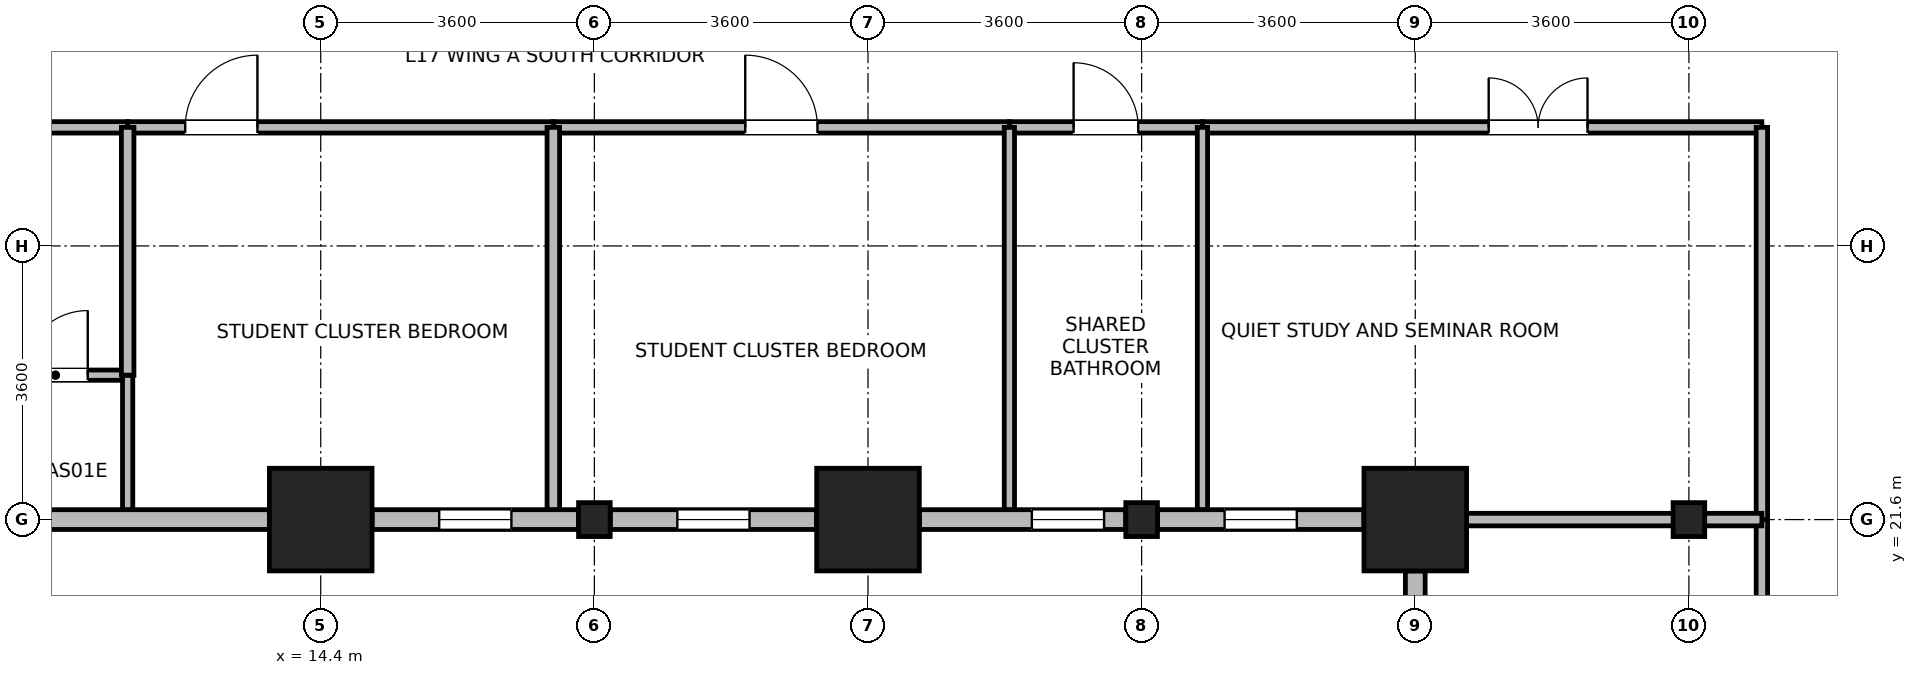
"""IFC4 building model, lengths in metres.
Left out: names, types, materials, properties, quantities, classifications, styles, units other than length and angle.
Written with IfcOpenShell. Run it as: python <this file> out.ifc"""

import sys

from ifc_helpers import new_model, si_unit, direction, frame, frame_2d, origin, origin_2d, place, context, subcontext, project, spatial, rectangle, i_section, extrude, source, transform, mapped, element, fill, save


model = new_model("IFC4")
c1 = context("Model", 3, precision=1e-05, world=origin(), true_north=direction((0.0, 1.0)))
c2 = subcontext(c1, "Body", "Model", "MODEL_VIEW")
j1 = project(units=[si_unit("LENGTHUNIT", "METRE"), si_unit("PLANEANGLEUNIT", "RADIAN")], contexts=[c1])
p1 = place(None, origin())
s1 = spatial("IfcSite", under=j1, at=p1, CompositionType="ELEMENT")
p2 = place(p1, origin())
s2 = spatial("IfcBuilding", under=s1, at=p2, CompositionType="ELEMENT")
p3 = place(p2, frame((0.0, 0.0, 69.7)))
s3 = spatial("IfcBuildingStorey", under=s2, at=p3, CompositionType="ELEMENT", Elevation=69.7)
m1 = source(origin(), c2, "Body", "SweptSolid", [
    extrude(rectangle(XDim=1.35, YDim=1.35, at=origin_2d()), origin(), (0.0, 0.0, 1.0), 3.7),
])
for number, where, z_axis, x_axis in (
    (1, (14.4, 21.6, 0.0), (0.0, 0.0, 1.0), (1.0, 0.0, 0.0)),
    (2, (21.6, 21.6, 0.0), (0.0, 0.0, 1.0), (1.0, 0.0, 0.0)),
    (3, (28.8, 21.6, 0.0), (0.0, 0.0, 1.0), (1.0, 0.0, 0.0)),
):
    element("IfcColumn", number, at=place(p3, frame(where, z_axis=z_axis, x_axis=x_axis)), inside=s3, PredefinedType="COLUMN", context=c2, shape_type="MappedRepresentation", body=[
        mapped(m1, transform((0.0, 0.0, 0.0), x_axis=(1.0, 0.0, 0.0), y_axis=(0.0, 1.0, 0.0), z_axis=(0.0, 0.0, 1.0), scale=1.0)),
    ])
m2 = source(origin(), c2, "Body", "SweptSolid", [
    extrude(i_section(OverallWidth=0.416, OverallDepth=0.446, WebThickness=0.029, FlangeThickness=0.04, FilletRadius=0.015, at=origin_2d()), origin(), (0.0, 0.0, 1.0), 3.7),
])
for number, where, z_axis, x_axis in (
    (4, (18.0, 21.6, 0.0), (0.0, 0.0, 1.0), (1.0, 0.0, 0.0)),
    (5, (25.2, 21.6, 0.0), (0.0, 0.0, 1.0), (1.0, 0.0, 0.0)),
    (6, (32.4, 21.6, 0.0), (0.0, 0.0, 1.0), (1.0, 0.0, 0.0)),
):
    element("IfcColumn", number, at=place(p3, frame(where, z_axis=z_axis, x_axis=x_axis)), inside=s3, PredefinedType="COLUMN", context=c2, shape_type="MappedRepresentation", body=[
        mapped(m2, transform((0.0, 0.0, 0.0), x_axis=(1.0, 0.0, 0.0), y_axis=(0.0, 1.0, 0.0), z_axis=(0.0, 0.0, 1.0), scale=1.0)),
    ])
p4 = place(p3, frame((13.724, 21.6, 0.0), z_axis=(0.0, 0.0, 1.0), x_axis=(-1.0, 0.0, 0.0)))
e7 = element("IfcWall", 7, at=p4, inside=s3, PredefinedType="STANDARD", context=c2, shape_type="SweptSolid", body=[
    extrude(rectangle(XDim=9.989, YDim=0.26, at=frame_2d((4.995, 0.0))), origin(), (0.0, 0.0, 1.0), 3.32),
])
p5 = place(p4, frame((4.244, 0.0, 0.85)))
e8 = element("IfcOpeningElement", 8, at=p5, cuts=e7, PredefinedType="OPENING", context=c2, shape_type="SweptSolid", body=[
    extrude(rectangle(XDim=1.5, YDim=1.85, at=frame_2d((0.75, 0.925))), frame((0.0, 0.14, 0.0), z_axis=(0.0, -1.0, 0.0), x_axis=(1.0, 0.0, 0.0)), (0.0, 0.0, 1.0), 0.28),
])
p6 = place(p4, frame((7.574, 0.0, 0.85)))
e9 = element("IfcOpeningElement", 9, at=p6, cuts=e7, PredefinedType="OPENING", context=c2, shape_type="SweptSolid", body=[
    extrude(rectangle(XDim=1.5, YDim=1.85, at=frame_2d((0.75, 0.925))), frame((0.0, 0.14, 0.0), z_axis=(0.0, -1.0, 0.0), x_axis=(1.0, 0.0, 0.0)), (0.0, 0.0, 1.0), 0.28),
])
p7 = place(p3, frame((17.791, 21.6, 0.0), z_axis=(0.0, 0.0, 1.0), x_axis=(-1.0, 0.0, 0.0)))
e10 = element("IfcWall", 10, at=p7, inside=s3, PredefinedType="STANDARD", context=c2, shape_type="SweptSolid", body=[
    extrude(rectangle(XDim=2.715, YDim=0.26, at=frame_2d((1.357, 0.0))), origin(), (0.0, 0.0, 1.0), 2.82),
])
p8 = place(p7, frame((0.883, 0.0, 0.85)))
e11 = element("IfcOpeningElement", 11, at=p8, cuts=e10, PredefinedType="OPENING", context=c2, shape_type="SweptSolid", body=[
    extrude(rectangle(XDim=0.95, YDim=1.75, at=frame_2d((0.475, 0.875))), frame((0.0, 0.14, 0.0), z_axis=(0.0, -1.0, 0.0), x_axis=(1.0, 0.0, 0.0)), (0.0, 0.0, 1.0), 0.28),
])
p9 = place(p3, frame((20.924, 21.6, 0.0), z_axis=(0.0, 0.0, 1.0), x_axis=(-1.0, 0.0, 0.0)))
e12 = element("IfcWall", 12, at=p9, inside=s3, PredefinedType="STANDARD", context=c2, shape_type="SweptSolid", body=[
    extrude(rectangle(XDim=2.715, YDim=0.26, at=frame_2d((1.357, 0.0))), origin(), (0.0, 0.0, 1.0), 2.82),
])
p10 = place(p9, frame((0.883, 0.0, 0.85)))
e13 = element("IfcOpeningElement", 13, at=p10, cuts=e12, PredefinedType="OPENING", context=c2, shape_type="SweptSolid", body=[
    extrude(rectangle(XDim=0.95, YDim=1.75, at=frame_2d((0.475, 0.875))), frame((0.0, 0.14, 0.0), z_axis=(0.0, -1.0, 0.0), x_axis=(1.0, 0.0, 0.0)), (0.0, 0.0, 1.0), 0.28),
])
p11 = place(p3, frame((24.991, 21.6, 0.0), z_axis=(0.0, 0.0, 1.0), x_axis=(-1.0, 0.0, 0.0)))
e14 = element("IfcWall", 14, at=p11, inside=s3, PredefinedType="STANDARD", context=c2, shape_type="SweptSolid", body=[
    extrude(rectangle(XDim=2.715, YDim=0.26, at=frame_2d((1.357, 0.0))), origin(), (0.0, 0.0, 1.0), 2.82),
])
p12 = place(p11, frame((0.285, 0.0, 0.85)))
e15 = element("IfcOpeningElement", 15, at=p12, cuts=e14, PredefinedType="OPENING", context=c2, shape_type="SweptSolid", body=[
    extrude(rectangle(XDim=0.95, YDim=1.75, at=frame_2d((0.475, 0.875))), frame((0.0, 0.14, 0.0), z_axis=(0.0, -1.0, 0.0), x_axis=(1.0, 0.0, 0.0)), (0.0, 0.0, 1.0), 0.28),
])
p13 = place(p3, frame((28.124, 21.6, 0.0), z_axis=(0.0, 0.0, 1.0), x_axis=(-1.0, 0.0, 0.0)))
e16 = element("IfcWall", 16, at=p13, inside=s3, PredefinedType="STANDARD", context=c2, shape_type="SweptSolid", body=[
    extrude(rectangle(XDim=2.715, YDim=0.26, at=frame_2d((1.357, 0.0))), origin(), (0.0, 0.0, 1.0), 2.82),
])
p14 = place(p13, frame((0.883, 0.0, 0.85)))
e17 = element("IfcOpeningElement", 17, at=p14, cuts=e16, PredefinedType="OPENING", context=c2, shape_type="SweptSolid", body=[
    extrude(rectangle(XDim=0.95, YDim=1.75, at=frame_2d((0.475, 0.875))), frame((0.0, 0.14, 0.0), z_axis=(0.0, -1.0, 0.0), x_axis=(1.0, 0.0, 0.0)), (0.0, 0.0, 1.0), 0.28),
])
p15 = place(p3, frame((28.8, 1.67, 0.0), z_axis=(0.0, 0.0, 1.0), x_axis=(0.0, 1.0, 0.0)))
e18 = element("IfcWall", 18, at=p15, inside=s3, PredefinedType="STANDARD", context=c2, shape_type="SweptSolid", body=[
    extrude(rectangle(XDim=19.254, YDim=0.26, at=frame_2d((9.627, 0.0))), origin(), (0.0, 0.0, 1.0), 3.32),
])
p16 = place(p15, frame((0.854, 0.0, 0.85)))
e19 = element("IfcOpeningElement", 19, at=p16, cuts=e18, PredefinedType="OPENING", context=c2, shape_type="SweptSolid", body=[
    extrude(rectangle(XDim=1.5, YDim=1.85, at=frame_2d((0.75, 0.925))), frame((0.0, 0.14, 0.0), z_axis=(0.0, -1.0, 0.0), x_axis=(1.0, 0.0, 0.0)), (0.0, 0.0, 1.0), 0.28),
])
p17 = place(p15, frame((7.272, 0.0, 0.85)))
e20 = element("IfcOpeningElement", 20, at=p17, cuts=e18, PredefinedType="OPENING", context=c2, shape_type="SweptSolid", body=[
    extrude(rectangle(XDim=1.5, YDim=1.85, at=frame_2d((0.75, 0.925))), frame((0.0, 0.14, 0.0), z_axis=(0.0, -1.0, 0.0), x_axis=(1.0, 0.0, 0.0)), (0.0, 0.0, 1.0), 0.28),
])
p18 = place(p15, frame((10.481, 0.0, 0.85)))
e21 = element("IfcOpeningElement", 21, at=p18, cuts=e18, PredefinedType="OPENING", context=c2, shape_type="SweptSolid", body=[
    extrude(rectangle(XDim=1.5, YDim=1.85, at=frame_2d((0.75, 0.925))), frame((0.0, 0.14, 0.0), z_axis=(0.0, -1.0, 0.0), x_axis=(1.0, 0.0, 0.0)), (0.0, 0.0, 1.0), 0.28),
])
p19 = place(p15, frame((13.69, 0.0, 0.85)))
e22 = element("IfcOpeningElement", 22, at=p19, cuts=e18, PredefinedType="OPENING", context=c2, shape_type="SweptSolid", body=[
    extrude(rectangle(XDim=1.5, YDim=1.85, at=frame_2d((0.75, 0.925))), frame((0.0, 0.14, 0.0), z_axis=(0.0, -1.0, 0.0), x_axis=(1.0, 0.0, 0.0)), (0.0, 0.0, 1.0), 0.28),
])
p20 = place(p15, frame((16.899, 0.0, 0.85)))
e23 = element("IfcOpeningElement", 23, at=p20, cuts=e18, PredefinedType="OPENING", context=c2, shape_type="SweptSolid", body=[
    extrude(rectangle(XDim=1.5, YDim=1.85, at=frame_2d((0.75, 0.925))), frame((0.0, 0.14, 0.0), z_axis=(0.0, -1.0, 0.0), x_axis=(1.0, 0.0, 0.0)), (0.0, 0.0, 1.0), 0.28),
])
p21 = place(p3, frame((9.96, 23.5, 0.0), z_axis=(0.0, 0.0, 1.0), x_axis=(1.0, 0.0, 0.0)))
e24 = element("IfcWall", 24, at=p21, inside=s3, PredefinedType="PARTITIONING", context=c2, shape_type="SweptSolid", body=[
    extrude(rectangle(XDim=1.9, YDim=0.135, at=frame_2d((0.95, 0.0))), origin(), (0.0, 0.0, 1.0), 3.32),
])
p22 = place(p21, frame((0.525, 0.0, 0.0)))
e25 = element("IfcOpeningElement", 25, at=p22, cuts=e24, PredefinedType="OPENING", context=c2, shape_type="SweptSolid", body=[
    extrude(rectangle(XDim=0.85, YDim=2.04, at=frame_2d((0.425, 1.02))), frame((0.0, 0.078, 0.0), z_axis=(0.0, -1.0, 0.0), x_axis=(1.0, 0.0, 0.0)), (0.0, 0.0, 1.0), 0.155),
])
p23 = place(p3, frame((11.86, 21.732, 0.0), z_axis=(0.0, 0.0, 1.0), x_axis=(0.0, 1.0, 0.0)))
e26 = element("IfcWall", 26, at=p23, inside=s3, PredefinedType="PARTITIONING", context=c2, shape_type="SweptSolid", body=[
    extrude(rectangle(XDim=1.768, YDim=0.135, at=frame_2d((0.884, 0.0))), origin(), (0.0, 0.0, 1.0), 3.32),
])
p24 = place(p3, frame((3.732, 26.76, 0.0), z_axis=(0.0, 0.0, 1.0), x_axis=(1.0, 0.0, 0.0)))
e27 = element("IfcWall", 27, at=p24, inside=s3, PredefinedType="PARTITIONING", context=c2, shape_type="SweptSolid", body=[
    extrude(rectangle(XDim=8.128, YDim=0.15, at=frame_2d((4.064, 0.0))), origin(), (0.0, 0.0, 1.0), 3.32),
])
p25 = place(p24, frame((4.402, 0.0, 0.0)))
e28 = element("IfcOpeningElement", 28, at=p25, cuts=e27, PredefinedType="OPENING", context=c2, shape_type="SweptSolid", body=[
    extrude(rectangle(XDim=0.95, YDim=2.1, at=frame_2d((0.475, 1.05))), frame((0.0, 0.085, 0.0), z_axis=(0.0, -1.0, 0.0), x_axis=(1.0, 0.0, 0.0)), (0.0, 0.0, 1.0), 0.17),
])
p26 = place(p3, frame((26.0, 26.76, 0.0), z_axis=(0.0, 0.0, 1.0), x_axis=(1.0, 0.0, 0.0)))
e29 = element("IfcWall", 29, at=p26, inside=s3, PredefinedType="PARTITIONING", context=c2, shape_type="SweptSolid", body=[
    extrude(rectangle(XDim=7.36, YDim=0.15, at=frame_2d((3.68, 0.0))), origin(), (0.0, 0.0, 1.0), 3.32),
])
p27 = place(p26, frame((3.766, 0.0, 0.0)))
e30 = element("IfcOpeningElement", 30, at=p27, cuts=e29, PredefinedType="OPENING", context=c2, shape_type="SweptSolid", body=[
    extrude(rectangle(XDim=1.3, YDim=2.12, at=frame_2d((0.65, 1.06))), frame((0.0, 0.085, 0.0), z_axis=(0.0, -1.0, 0.0), x_axis=(1.0, 0.0, 0.0)), (0.0, 0.0, 1.0), 0.17),
])
p28 = place(p3, frame((33.36, 14.5, 0.0), z_axis=(0.0, 0.0, 1.0), x_axis=(0.0, 1.0, 0.0)))
e31 = element("IfcWall", 31, at=p28, inside=s3, PredefinedType="PARTITIONING", context=c2, shape_type="SweptSolid", body=[
    extrude(rectangle(XDim=7.1, YDim=0.15, at=frame_2d((3.55, 0.0))), origin(), (0.0, 0.0, 1.0), 3.32),
])
p29 = place(p28, frame((2.9, 0.0, 0.0)))
e32 = element("IfcOpeningElement", 32, at=p29, cuts=e31, PredefinedType="OPENING", context=c2, shape_type="SweptSolid", body=[
    extrude(rectangle(XDim=1.3, YDim=2.12, at=frame_2d((0.65, 1.06))), frame((0.0, 0.085, 0.0), z_axis=(0.0, -1.0, 0.0), x_axis=(1.0, 0.0, 0.0)), (0.0, 0.0, 1.0), 0.17),
])
p30 = place(p3, frame((17.46, 26.76, 0.0), z_axis=(0.0, 0.0, 1.0), x_axis=(1.0, 0.0, 0.0)))
e33 = element("IfcWall", 33, at=p30, inside=s3, PredefinedType="PARTITIONING", context=c2, shape_type="SweptSolid", body=[
    extrude(rectangle(XDim=6.0, YDim=0.15, at=frame_2d((3.0, 0.0))), origin(), (0.0, 0.0, 1.0), 3.32),
])
p31 = place(p30, frame((2.525, 0.0, 0.0)))
e34 = element("IfcOpeningElement", 34, at=p31, cuts=e33, PredefinedType="OPENING", context=c2, shape_type="SweptSolid", body=[
    extrude(rectangle(XDim=0.95, YDim=2.1, at=frame_2d((0.475, 1.05))), frame((0.0, 0.085, 0.0), z_axis=(0.0, -1.0, 0.0), x_axis=(1.0, 0.0, 0.0)), (0.0, 0.0, 1.0), 0.17),
])
p32 = place(p3, frame((11.86, 26.76, 0.0), z_axis=(0.0, 0.0, 1.0), x_axis=(1.0, 0.0, 0.0)))
e35 = element("IfcWall", 35, at=p32, inside=s3, PredefinedType="PARTITIONING", context=c2, shape_type="SweptSolid", body=[
    extrude(rectangle(XDim=5.6, YDim=0.15, at=frame_2d((2.8, 0.0))), origin(), (0.0, 0.0, 1.0), 3.32),
])
p33 = place(p32, frame((0.757, 0.0, 0.0)))
e36 = element("IfcOpeningElement", 36, at=p33, cuts=e35, PredefinedType="OPENING", context=c2, shape_type="SweptSolid", body=[
    extrude(rectangle(XDim=0.95, YDim=2.1, at=frame_2d((0.475, 1.05))), frame((0.0, 0.085, 0.0), z_axis=(0.0, -1.0, 0.0), x_axis=(1.0, 0.0, 0.0)), (0.0, 0.0, 1.0), 0.17),
])
p34 = place(p3, frame((33.36, 21.6, 0.0), z_axis=(0.0, 0.0, 1.0), x_axis=(0.0, 1.0, 0.0)))
e37 = element("IfcWall", 37, at=p34, inside=s3, PredefinedType="PARTITIONING", context=c2, shape_type="SweptSolid", body=[
    extrude(rectangle(XDim=5.16, YDim=0.15, at=frame_2d((2.58, 0.0))), origin(), (0.0, 0.0, 1.0), 3.32),
])
p35 = place(p3, frame((23.46, 26.76, 0.0), z_axis=(0.0, 0.0, 1.0), x_axis=(1.0, 0.0, 0.0)))
e38 = element("IfcWall", 38, at=p35, inside=s3, PredefinedType="PARTITIONING", context=c2, shape_type="SweptSolid", body=[
    extrude(rectangle(XDim=2.54, YDim=0.15, at=frame_2d((1.27, 0.0))), origin(), (0.0, 0.0, 1.0), 3.32),
])
p36 = place(p35, frame((0.845, 0.0, 0.0)))
e39 = element("IfcOpeningElement", 39, at=p36, cuts=e38, PredefinedType="OPENING", context=c2, shape_type="SweptSolid", body=[
    extrude(rectangle(XDim=0.85, YDim=2.04, at=frame_2d((0.425, 1.02))), frame((0.0, 0.085, 0.0), z_axis=(0.0, -1.0, 0.0), x_axis=(1.0, 0.0, 0.0)), (0.0, 0.0, 1.0), 0.17),
])
p37 = place(p3, frame((17.46, 21.732, 0.0), z_axis=(0.0, 0.0, 1.0), x_axis=(0.0, 1.0, 0.0)))
e40 = element("IfcWall", 40, at=p37, inside=s3, PredefinedType="PARTITIONING", context=c2, shape_type="SweptSolid", body=[
    extrude(rectangle(XDim=5.028, YDim=0.165, at=frame_2d((2.514, 0.0))), origin(), (0.0, 0.0, 1.0), 3.32),
])
for number, where, z_axis, x_axis in (
    (41, (23.46, 21.732, 0.0), (0.0, 0.0, 1.0), (0.0, 1.0, 0.0)),
    (42, (26.0, 21.732, 0.0), (0.0, 0.0, 1.0), (0.0, 1.0, 0.0)),
):
    element("IfcWall", number, at=place(p3, frame(where, z_axis=z_axis, x_axis=x_axis)), inside=s3, PredefinedType="PARTITIONING", context=c2, shape_type="SweptSolid", body=[
        extrude(rectangle(XDim=5.028, YDim=0.135, at=frame_2d((2.514, 0.0))), origin(), (0.0, 0.0, 1.0), 3.32),
    ])
p38 = place(p3, frame((28.932, 21.6, 0.0), z_axis=(0.0, 0.0, 1.0), x_axis=(1.0, 0.0, 0.0)))
e43 = element("IfcWall", 43, at=p38, inside=s3, PredefinedType="PARTITIONING", context=c2, shape_type="SweptSolid", body=[
    extrude(rectangle(XDim=4.428, YDim=0.165, at=frame_2d((2.214, 0.0))), origin(), (0.0, 0.0, 1.0), 2.82),
])
p39 = place(p3, frame((11.86, 23.5, 0.0), z_axis=(0.0, 0.0, 1.0), x_axis=(0.0, 1.0, 0.0)))
e44 = element("IfcWall", 44, at=p39, inside=s3, PredefinedType="PARTITIONING", context=c2, shape_type="SweptSolid", body=[
    extrude(rectangle(XDim=3.26, YDim=0.165, at=frame_2d((1.63, 0.0))), origin(), (0.0, 0.0, 1.0), 3.32),
])
p40 = place(p8, origin())
e45 = element("IfcWindow", 45, at=p40, inside=s3, PartitioningType="SINGLE_PANEL", PredefinedType="WINDOW", context=c2, shape_type="SweptSolid", body=[
    extrude(rectangle(XDim=0.95, YDim=1.75, at=frame_2d((0.475, 0.875))), frame((0.0, 0.03, 0.0), z_axis=(0.0, -1.0, 0.0), x_axis=(1.0, 0.0, 0.0)), (0.0, 0.0, 1.0), 0.06),
])
fill(e11, e45)
p41 = place(p10, origin())
e46 = element("IfcWindow", 46, at=p41, inside=s3, PartitioningType="SINGLE_PANEL", PredefinedType="WINDOW", context=c2, shape_type="SweptSolid", body=[
    extrude(rectangle(XDim=0.95, YDim=1.75, at=frame_2d((0.475, 0.875))), frame((0.0, 0.03, 0.0), z_axis=(0.0, -1.0, 0.0), x_axis=(1.0, 0.0, 0.0)), (0.0, 0.0, 1.0), 0.06),
])
fill(e13, e46)
p42 = place(p12, origin())
e47 = element("IfcWindow", 47, at=p42, inside=s3, PartitioningType="SINGLE_PANEL", PredefinedType="WINDOW", context=c2, shape_type="SweptSolid", body=[
    extrude(rectangle(XDim=0.95, YDim=1.75, at=frame_2d((0.475, 0.875))), frame((0.0, 0.03, 0.0), z_axis=(0.0, -1.0, 0.0), x_axis=(1.0, 0.0, 0.0)), (0.0, 0.0, 1.0), 0.06),
])
fill(e15, e47)
p43 = place(p14, origin())
e48 = element("IfcWindow", 48, at=p43, inside=s3, PartitioningType="SINGLE_PANEL", PredefinedType="WINDOW", context=c2, shape_type="SweptSolid", body=[
    extrude(rectangle(XDim=0.95, YDim=1.75, at=frame_2d((0.475, 0.875))), frame((0.0, 0.03, 0.0), z_axis=(0.0, -1.0, 0.0), x_axis=(1.0, 0.0, 0.0)), (0.0, 0.0, 1.0), 0.06),
])
fill(e17, e48)
p44 = place(p22, origin())
e49 = element("IfcDoor", 49, at=p44, inside=s3, OperationType="SINGLE_SWING_RIGHT", PredefinedType="DOOR", context=c2, shape_type="SweptSolid", body=[
    extrude(rectangle(XDim=0.85, YDim=2.04, at=frame_2d((0.425, 1.02))), frame((0.0, 0.025, 0.0), z_axis=(0.0, -1.0, 0.0), x_axis=(1.0, 0.0, 0.0)), (0.0, 0.0, 1.0), 0.05),
])
fill(e25, e49)
p45 = place(p27, origin())
e50 = element("IfcDoor", 50, at=p45, inside=s3, OperationType="DOUBLE_DOOR_SINGLE_SWING", PredefinedType="DOOR", context=c2, shape_type="SweptSolid", body=[
    extrude(rectangle(XDim=1.3, YDim=2.12, at=frame_2d((0.65, 1.06))), frame((0.0, 0.025, 0.0), z_axis=(0.0, -1.0, 0.0), x_axis=(1.0, 0.0, 0.0)), (0.0, 0.0, 1.0), 0.05),
])
fill(e30, e50)
p46 = place(p31, origin())
e51 = element("IfcDoor", 51, at=p46, inside=s3, OperationType="SINGLE_SWING_LEFT", PredefinedType="DOOR", context=c2, shape_type="SweptSolid", body=[
    extrude(rectangle(XDim=0.95, YDim=2.1, at=frame_2d((0.475, 1.05))), frame((0.0, 0.025, 0.0), z_axis=(0.0, -1.0, 0.0), x_axis=(1.0, 0.0, 0.0)), (0.0, 0.0, 1.0), 0.05),
])
fill(e34, e51)
p47 = place(p33, origin())
e52 = element("IfcDoor", 52, at=p47, inside=s3, OperationType="SINGLE_SWING_RIGHT", PredefinedType="DOOR", context=c2, shape_type="SweptSolid", body=[
    extrude(rectangle(XDim=0.95, YDim=2.1, at=frame_2d((0.475, 1.05))), frame((0.0, 0.025, 0.0), z_axis=(0.0, -1.0, 0.0), x_axis=(1.0, 0.0, 0.0)), (0.0, 0.0, 1.0), 0.05),
])
fill(e36, e52)
p48 = place(p36, origin())
e53 = element("IfcDoor", 53, at=p48, inside=s3, OperationType="SINGLE_SWING_LEFT", PredefinedType="DOOR", context=c2, shape_type="SweptSolid", body=[
    extrude(rectangle(XDim=0.85, YDim=2.04, at=frame_2d((0.425, 1.02))), frame((0.0, 0.025, 0.0), z_axis=(0.0, -1.0, 0.0), x_axis=(1.0, 0.0, 0.0)), (0.0, 0.0, 1.0), 0.05),
])
fill(e39, e53)
save(model, sys.argv[1])
